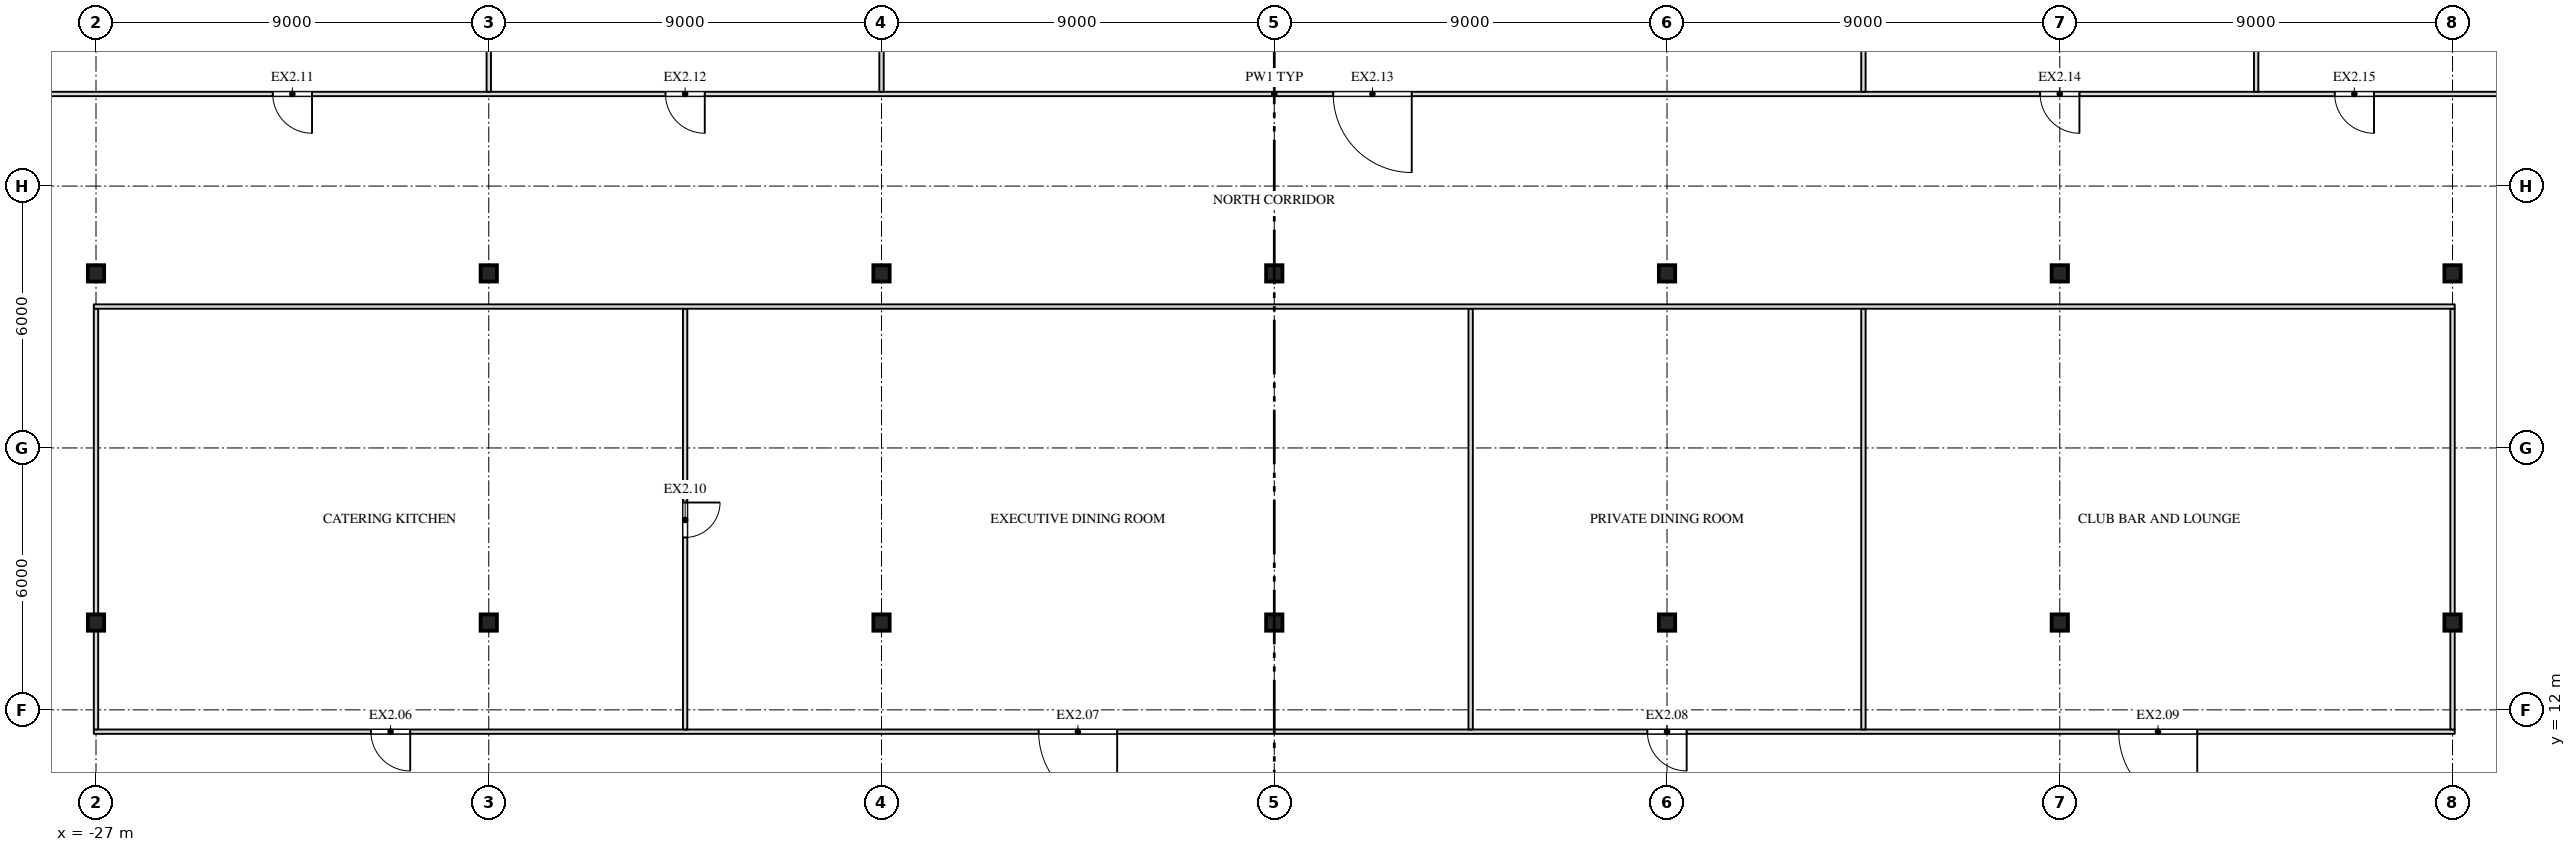
"""IFC4 building model, lengths in metres.
Left out: names, types, materials, properties, quantities, classifications, styles, units other than length and angle.
Written with IfcOpenShell. Run it as: python <this file> out.ifc"""

import sys

from ifc_helpers import new_model, si_unit, direction, frame, frame_2d, origin, origin_2d, place, context, subcontext, project, spatial, rectangle, i_section, extrude, element, fill, save


model = new_model("IFC4")
c1 = context("Model", 3, precision=1e-05, world=origin(), true_north=direction((0.0, 1.0)))
c2 = subcontext(c1, "Body", "Model", "MODEL_VIEW")
j1 = project(units=[si_unit("LENGTHUNIT", "METRE"), si_unit("PLANEANGLEUNIT", "RADIAN")], contexts=[c1])
p1 = place(None, origin())
s1 = spatial("IfcSite", under=j1, at=p1, CompositionType="ELEMENT")
p2 = place(p1, origin())
s2 = spatial("IfcBuilding", under=s1, at=p2, CompositionType="ELEMENT")
p3 = place(p2, frame((0.0, 0.0, 276.5)))
s3 = spatial("IfcBuildingStorey", under=s2, at=p3, CompositionType="ELEMENT", Elevation=276.5)
for number, where, z_axis, x_axis in (
    (1, (-27.0, 14.0, 0.0), (0.0, 0.0, 1.0), (1.0, 0.0, 0.0)),
    (2, (-18.0, 14.0, 0.0), (0.0, 0.0, 1.0), (1.0, 0.0, 0.0)),
    (3, (-9.0, 14.0, 0.0), (0.0, 0.0, 1.0), (1.0, 0.0, 0.0)),
    (4, (0.0, 14.0, 0.0), (0.0, 0.0, 1.0), (1.0, 0.0, 0.0)),
    (5, (9.0, 14.0, 0.0), (0.0, 0.0, 1.0), (1.0, 0.0, 0.0)),
    (6, (18.0, 14.0, 0.0), (0.0, 0.0, 1.0), (1.0, 0.0, 0.0)),
    (7, (27.0, 14.0, 0.0), (0.0, 0.0, 1.0), (1.0, 0.0, 0.0)),
    (8, (-27.0, 22.0, 0.0), (0.0, 0.0, 1.0), (1.0, 0.0, 0.0)),
    (9, (-18.0, 22.0, 0.0), (0.0, 0.0, 1.0), (1.0, 0.0, 0.0)),
    (10, (-9.0, 22.0, 0.0), (0.0, 0.0, 1.0), (1.0, 0.0, 0.0)),
    (11, (0.0, 22.0, 0.0), (0.0, 0.0, 1.0), (1.0, 0.0, 0.0)),
    (12, (9.0, 22.0, 0.0), (0.0, 0.0, 1.0), (1.0, 0.0, 0.0)),
    (13, (18.0, 22.0, 0.0), (0.0, 0.0, 1.0), (1.0, 0.0, 0.0)),
    (14, (27.0, 22.0, 0.0), (0.0, 0.0, 1.0), (1.0, 0.0, 0.0)),
):
    element("IfcColumn", number, at=place(p3, frame(where, z_axis=z_axis, x_axis=x_axis)), inside=s3, PredefinedType="COLUMN", context=c2, shape_type="SweptSolid", body=[
        extrude(i_section(OverallWidth=0.373, OverallDepth=0.373, WebThickness=0.016, FlangeThickness=0.026, at=origin_2d()), origin(), (0.0, 0.0, 1.0), 4.0),
    ])
p4 = place(p3, frame((-27.05, 11.5, 0.0), z_axis=(0.0, 0.0, 1.0), x_axis=(1.0, 0.0, 0.0)))
e15 = element("IfcWall", 15, at=p4, inside=s3, PredefinedType="PARTITIONING", context=c2, shape_type="SweptSolid", body=[
    extrude(rectangle(XDim=54.1, YDim=0.1, at=frame_2d((27.05, 0.0))), origin(), (0.0, 0.0, 1.0), 3.78),
])
p5 = place(p4, frame((6.35, 0.0, 0.0)))
e16 = element("IfcOpeningElement", 16, at=p5, cuts=e15, PredefinedType="OPENING", context=c2, shape_type="SweptSolid", body=[
    extrude(rectangle(XDim=0.9, YDim=2.1, at=frame_2d((0.45, 1.05))), frame((0.0, 0.062, 0.0), z_axis=(0.0, -1.0, 0.0), x_axis=(1.0, 0.0, 0.0)), (0.0, 0.0, 1.0), 0.124),
])
p6 = place(p4, frame((21.65, 0.0, 0.0)))
e17 = element("IfcOpeningElement", 17, at=p6, cuts=e15, PredefinedType="OPENING", context=c2, shape_type="SweptSolid", body=[
    extrude(rectangle(XDim=1.8, YDim=2.1, at=frame_2d((0.9, 1.05))), frame((0.0, 0.062, 0.0), z_axis=(0.0, -1.0, 0.0), x_axis=(1.0, 0.0, 0.0)), (0.0, 0.0, 1.0), 0.124),
])
p7 = place(p4, frame((35.6, 0.0, 0.0)))
e18 = element("IfcOpeningElement", 18, at=p7, cuts=e15, PredefinedType="OPENING", context=c2, shape_type="SweptSolid", body=[
    extrude(rectangle(XDim=0.9, YDim=2.1, at=frame_2d((0.45, 1.05))), frame((0.0, 0.062, 0.0), z_axis=(0.0, -1.0, 0.0), x_axis=(1.0, 0.0, 0.0)), (0.0, 0.0, 1.0), 0.124),
])
p8 = place(p4, frame((46.4, 0.0, 0.0)))
e19 = element("IfcOpeningElement", 19, at=p8, cuts=e15, PredefinedType="OPENING", context=c2, shape_type="SweptSolid", body=[
    extrude(rectangle(XDim=1.8, YDim=2.1, at=frame_2d((0.9, 1.05))), frame((0.0, 0.062, 0.0), z_axis=(0.0, -1.0, 0.0), x_axis=(1.0, 0.0, 0.0)), (0.0, 0.0, 1.0), 0.124),
])
p9 = place(p3, frame((-27.0, 11.55, 0.0), z_axis=(0.0, 0.0, 1.0), x_axis=(0.0, 1.0, 0.0)))
e20 = element("IfcWall", 20, at=p9, inside=s3, PredefinedType="PARTITIONING", context=c2, shape_type="SweptSolid", body=[
    extrude(rectangle(XDim=2.263, YDim=0.1, at=frame_2d((1.132, 0.0))), origin(), (0.0, 0.0, 1.0), 3.247),
])
p10 = place(p3, frame((-27.0, 14.187, 0.0), z_axis=(0.0, 0.0, 1.0), x_axis=(0.0, 1.0, 0.0)))
e21 = element("IfcWall", 21, at=p10, inside=s3, PredefinedType="PARTITIONING", context=c2, shape_type="SweptSolid", body=[
    extrude(rectangle(XDim=7.003, YDim=0.1, at=frame_2d((3.501, 0.0))), origin(), (0.0, 0.0, 1.0), 3.247),
])
p11 = place(p3, frame((-13.5, 11.55, 0.0), z_axis=(0.0, 0.0, 1.0), x_axis=(0.0, 1.0, 0.0)))
e22 = element("IfcWall", 22, at=p11, inside=s3, PredefinedType="PARTITIONING", context=c2, shape_type="SweptSolid", body=[
    extrude(rectangle(XDim=9.64, YDim=0.1, at=frame_2d((4.82, 0.0))), origin(), (0.0, 0.0, 1.0), 3.247),
])
p12 = place(p11, frame((4.4, 0.0, 0.0)))
e23 = element("IfcOpeningElement", 23, at=p12, cuts=e22, PredefinedType="OPENING", context=c2, shape_type="SweptSolid", body=[
    extrude(rectangle(XDim=0.8, YDim=2.1, at=frame_2d((0.4, 1.05))), frame((0.0, 0.062, 0.0), z_axis=(0.0, -1.0, 0.0), x_axis=(1.0, 0.0, 0.0)), (0.0, 0.0, 1.0), 0.124),
])
for number, where, z_axis, x_axis in (
    (24, (4.5, 11.55, 0.0), (0.0, 0.0, 1.0), (0.0, 1.0, 0.0)),
    (25, (13.5, 11.55, 0.0), (0.0, 0.0, 1.0), (0.0, 1.0, 0.0)),
):
    element("IfcWall", number, at=place(p3, frame(where, z_axis=z_axis, x_axis=x_axis)), inside=s3, PredefinedType="PARTITIONING", context=c2, shape_type="SweptSolid", body=[
        extrude(rectangle(XDim=9.64, YDim=0.1, at=frame_2d((4.82, 0.0))), origin(), (0.0, 0.0, 1.0), 3.247),
    ])
p13 = place(p3, frame((27.0, 11.55, 0.0), z_axis=(0.0, 0.0, 1.0), x_axis=(0.0, 1.0, 0.0)))
e26 = element("IfcWall", 26, at=p13, inside=s3, PredefinedType="PARTITIONING", context=c2, shape_type="SweptSolid", body=[
    extrude(rectangle(XDim=2.263, YDim=0.1, at=frame_2d((1.132, 0.0))), origin(), (0.0, 0.0, 1.0), 3.247),
])
p14 = place(p3, frame((27.0, 14.187, 0.0), z_axis=(0.0, 0.0, 1.0), x_axis=(0.0, 1.0, 0.0)))
e27 = element("IfcWall", 27, at=p14, inside=s3, PredefinedType="PARTITIONING", context=c2, shape_type="SweptSolid", body=[
    extrude(rectangle(XDim=7.003, YDim=0.1, at=frame_2d((3.501, 0.0))), origin(), (0.0, 0.0, 1.0), 3.247),
])
p15 = place(p3, frame((-27.05, 21.24, 0.0), z_axis=(0.0, 0.0, 1.0), x_axis=(1.0, 0.0, 0.0)))
e28 = element("IfcWall", 28, at=p15, inside=s3, PredefinedType="PARTITIONING", context=c2, shape_type="SweptSolid", body=[
    extrude(rectangle(XDim=54.1, YDim=0.1, at=frame_2d((27.05, 0.0))), origin(), (0.0, 0.0, 1.0), 3.78),
])
p16 = place(p3, frame((-35.2, 26.11, 0.0), z_axis=(0.0, 0.0, 1.0), x_axis=(1.0, 0.0, 0.0)))
e29 = element("IfcWall", 29, at=p16, inside=s3, PredefinedType="PARTITIONING", context=c2, shape_type="SweptSolid", body=[
    extrude(rectangle(XDim=70.4, YDim=0.1, at=frame_2d((35.2, 0.0))), origin(), (0.0, 0.0, 1.0), 3.78),
])
p17 = place(p16, frame((12.25, 0.0, 0.0)))
e30 = element("IfcOpeningElement", 30, at=p17, cuts=e29, PredefinedType="OPENING", context=c2, shape_type="SweptSolid", body=[
    extrude(rectangle(XDim=0.9, YDim=2.1, at=frame_2d((0.45, 1.05))), frame((0.0, 0.062, 0.0), z_axis=(0.0, -1.0, 0.0), x_axis=(1.0, 0.0, 0.0)), (0.0, 0.0, 1.0), 0.124),
])
p18 = place(p16, frame((21.25, 0.0, 0.0)))
e31 = element("IfcOpeningElement", 31, at=p18, cuts=e29, PredefinedType="OPENING", context=c2, shape_type="SweptSolid", body=[
    extrude(rectangle(XDim=0.9, YDim=2.1, at=frame_2d((0.45, 1.05))), frame((0.0, 0.062, 0.0), z_axis=(0.0, -1.0, 0.0), x_axis=(1.0, 0.0, 0.0)), (0.0, 0.0, 1.0), 0.124),
])
p19 = place(p16, frame((36.55, 0.0, 0.0)))
e32 = element("IfcOpeningElement", 32, at=p19, cuts=e29, PredefinedType="OPENING", context=c2, shape_type="SweptSolid", body=[
    extrude(rectangle(XDim=1.8, YDim=2.1, at=frame_2d((0.9, 1.05))), frame((0.0, 0.062, 0.0), z_axis=(0.0, -1.0, 0.0), x_axis=(1.0, 0.0, 0.0)), (0.0, 0.0, 1.0), 0.124),
])
p20 = place(p16, frame((52.75, 0.0, 0.0)))
e33 = element("IfcOpeningElement", 33, at=p20, cuts=e29, PredefinedType="OPENING", context=c2, shape_type="SweptSolid", body=[
    extrude(rectangle(XDim=0.9, YDim=2.1, at=frame_2d((0.45, 1.05))), frame((0.0, 0.062, 0.0), z_axis=(0.0, -1.0, 0.0), x_axis=(1.0, 0.0, 0.0)), (0.0, 0.0, 1.0), 0.124),
])
p21 = place(p16, frame((59.5, 0.0, 0.0)))
e34 = element("IfcOpeningElement", 34, at=p21, cuts=e29, PredefinedType="OPENING", context=c2, shape_type="SweptSolid", body=[
    extrude(rectangle(XDim=0.9, YDim=2.1, at=frame_2d((0.45, 1.05))), frame((0.0, 0.062, 0.0), z_axis=(0.0, -1.0, 0.0), x_axis=(1.0, 0.0, 0.0)), (0.0, 0.0, 1.0), 0.124),
])
for number, where, z_axis, x_axis in (
    (35, (-18.0, 26.16, 0.0), (0.0, 0.0, 1.0), (0.0, 1.0, 0.0)),
    (36, (-9.0, 26.16, 0.0), (0.0, 0.0, 1.0), (0.0, 1.0, 0.0)),
):
    element("IfcWall", number, at=place(p3, frame(where, z_axis=z_axis, x_axis=x_axis)), inside=s3, PredefinedType="PARTITIONING", context=c2, shape_type="SweptSolid", body=[
        extrude(rectangle(XDim=1.653, YDim=0.1, at=frame_2d((0.827, 0.0))), origin(), (0.0, 0.0, 1.0), 3.247),
    ])
for number, where, z_axis, x_axis in (
    (37, (13.5, 26.16, 0.0), (0.0, 0.0, 1.0), (0.0, 1.0, 0.0)),
    (38, (22.5, 26.16, 0.0), (0.0, 0.0, 1.0), (0.0, 1.0, 0.0)),
):
    element("IfcWall", number, at=place(p3, frame(where, z_axis=z_axis, x_axis=x_axis)), inside=s3, PredefinedType="PARTITIONING", context=c2, shape_type="SweptSolid", body=[
        extrude(rectangle(XDim=8.945, YDim=0.1, at=frame_2d((4.472, 0.0))), origin(), (0.0, 0.0, 1.0), 3.247),
    ])
p22 = place(p5, origin())
e39 = element("IfcDoor", 39, at=p22, inside=s3, OperationType="SINGLE_SWING_LEFT", PredefinedType="DOOR", context=c2, shape_type="SweptSolid", body=[
    extrude(rectangle(XDim=0.9, YDim=2.1, at=frame_2d((0.45, 1.05))), frame((0.0, 0.025, 0.0), z_axis=(0.0, -1.0, 0.0), x_axis=(1.0, 0.0, 0.0)), (0.0, 0.0, 1.0), 0.05),
])
fill(e16, e39)
p23 = place(p6, origin())
e40 = element("IfcDoor", 40, at=p23, inside=s3, OperationType="DOUBLE_DOOR_SINGLE_SWING", PredefinedType="DOOR", context=c2, shape_type="SweptSolid", body=[
    extrude(rectangle(XDim=1.8, YDim=2.1, at=frame_2d((0.9, 1.05))), frame((0.0, 0.025, 0.0), z_axis=(0.0, -1.0, 0.0), x_axis=(1.0, 0.0, 0.0)), (0.0, 0.0, 1.0), 0.05),
])
fill(e17, e40)
p24 = place(p7, origin())
e41 = element("IfcDoor", 41, at=p24, inside=s3, OperationType="SINGLE_SWING_LEFT", PredefinedType="DOOR", context=c2, shape_type="SweptSolid", body=[
    extrude(rectangle(XDim=0.9, YDim=2.1, at=frame_2d((0.45, 1.05))), frame((0.0, 0.025, 0.0), z_axis=(0.0, -1.0, 0.0), x_axis=(1.0, 0.0, 0.0)), (0.0, 0.0, 1.0), 0.05),
])
fill(e18, e41)
p25 = place(p8, origin())
e42 = element("IfcDoor", 42, at=p25, inside=s3, OperationType="DOUBLE_DOOR_SINGLE_SWING", PredefinedType="DOOR", context=c2, shape_type="SweptSolid", body=[
    extrude(rectangle(XDim=1.8, YDim=2.1, at=frame_2d((0.9, 1.05))), frame((0.0, 0.025, 0.0), z_axis=(0.0, -1.0, 0.0), x_axis=(1.0, 0.0, 0.0)), (0.0, 0.0, 1.0), 0.05),
])
fill(e19, e42)
p26 = place(p12, origin())
e43 = element("IfcDoor", 43, at=p26, inside=s3, OperationType="SINGLE_SWING_LEFT", PredefinedType="DOOR", context=c2, shape_type="SweptSolid", body=[
    extrude(rectangle(XDim=0.8, YDim=2.1, at=frame_2d((0.4, 1.05))), frame((0.0, 0.025, 0.0), z_axis=(0.0, -1.0, 0.0), x_axis=(1.0, 0.0, 0.0)), (0.0, 0.0, 1.0), 0.05),
])
fill(e23, e43)
p27 = place(p17, origin())
e44 = element("IfcDoor", 44, at=p27, inside=s3, OperationType="SINGLE_SWING_LEFT", PredefinedType="DOOR", context=c2, shape_type="SweptSolid", body=[
    extrude(rectangle(XDim=0.9, YDim=2.1, at=frame_2d((0.45, 1.05))), frame((0.0, 0.025, 0.0), z_axis=(0.0, -1.0, 0.0), x_axis=(1.0, 0.0, 0.0)), (0.0, 0.0, 1.0), 0.05),
])
fill(e30, e44)
p28 = place(p18, origin())
e45 = element("IfcDoor", 45, at=p28, inside=s3, OperationType="SINGLE_SWING_LEFT", PredefinedType="DOOR", context=c2, shape_type="SweptSolid", body=[
    extrude(rectangle(XDim=0.9, YDim=2.1, at=frame_2d((0.45, 1.05))), frame((0.0, 0.025, 0.0), z_axis=(0.0, -1.0, 0.0), x_axis=(1.0, 0.0, 0.0)), (0.0, 0.0, 1.0), 0.05),
])
fill(e31, e45)
p29 = place(p19, origin())
e46 = element("IfcDoor", 46, at=p29, inside=s3, OperationType="DOUBLE_DOOR_SINGLE_SWING", PredefinedType="DOOR", context=c2, shape_type="SweptSolid", body=[
    extrude(rectangle(XDim=1.8, YDim=2.1, at=frame_2d((0.9, 1.05))), frame((0.0, 0.025, 0.0), z_axis=(0.0, -1.0, 0.0), x_axis=(1.0, 0.0, 0.0)), (0.0, 0.0, 1.0), 0.05),
])
fill(e32, e46)
p30 = place(p20, origin())
e47 = element("IfcDoor", 47, at=p30, inside=s3, OperationType="SINGLE_SWING_LEFT", PredefinedType="DOOR", context=c2, shape_type="SweptSolid", body=[
    extrude(rectangle(XDim=0.9, YDim=2.1, at=frame_2d((0.45, 1.05))), frame((0.0, 0.025, 0.0), z_axis=(0.0, -1.0, 0.0), x_axis=(1.0, 0.0, 0.0)), (0.0, 0.0, 1.0), 0.05),
])
fill(e33, e47)
p31 = place(p21, origin())
e48 = element("IfcDoor", 48, at=p31, inside=s3, OperationType="SINGLE_SWING_LEFT", PredefinedType="DOOR", context=c2, shape_type="SweptSolid", body=[
    extrude(rectangle(XDim=0.9, YDim=2.1, at=frame_2d((0.45, 1.05))), frame((0.0, 0.025, 0.0), z_axis=(0.0, -1.0, 0.0), x_axis=(1.0, 0.0, 0.0)), (0.0, 0.0, 1.0), 0.05),
])
fill(e34, e48)
save(model, sys.argv[1])
